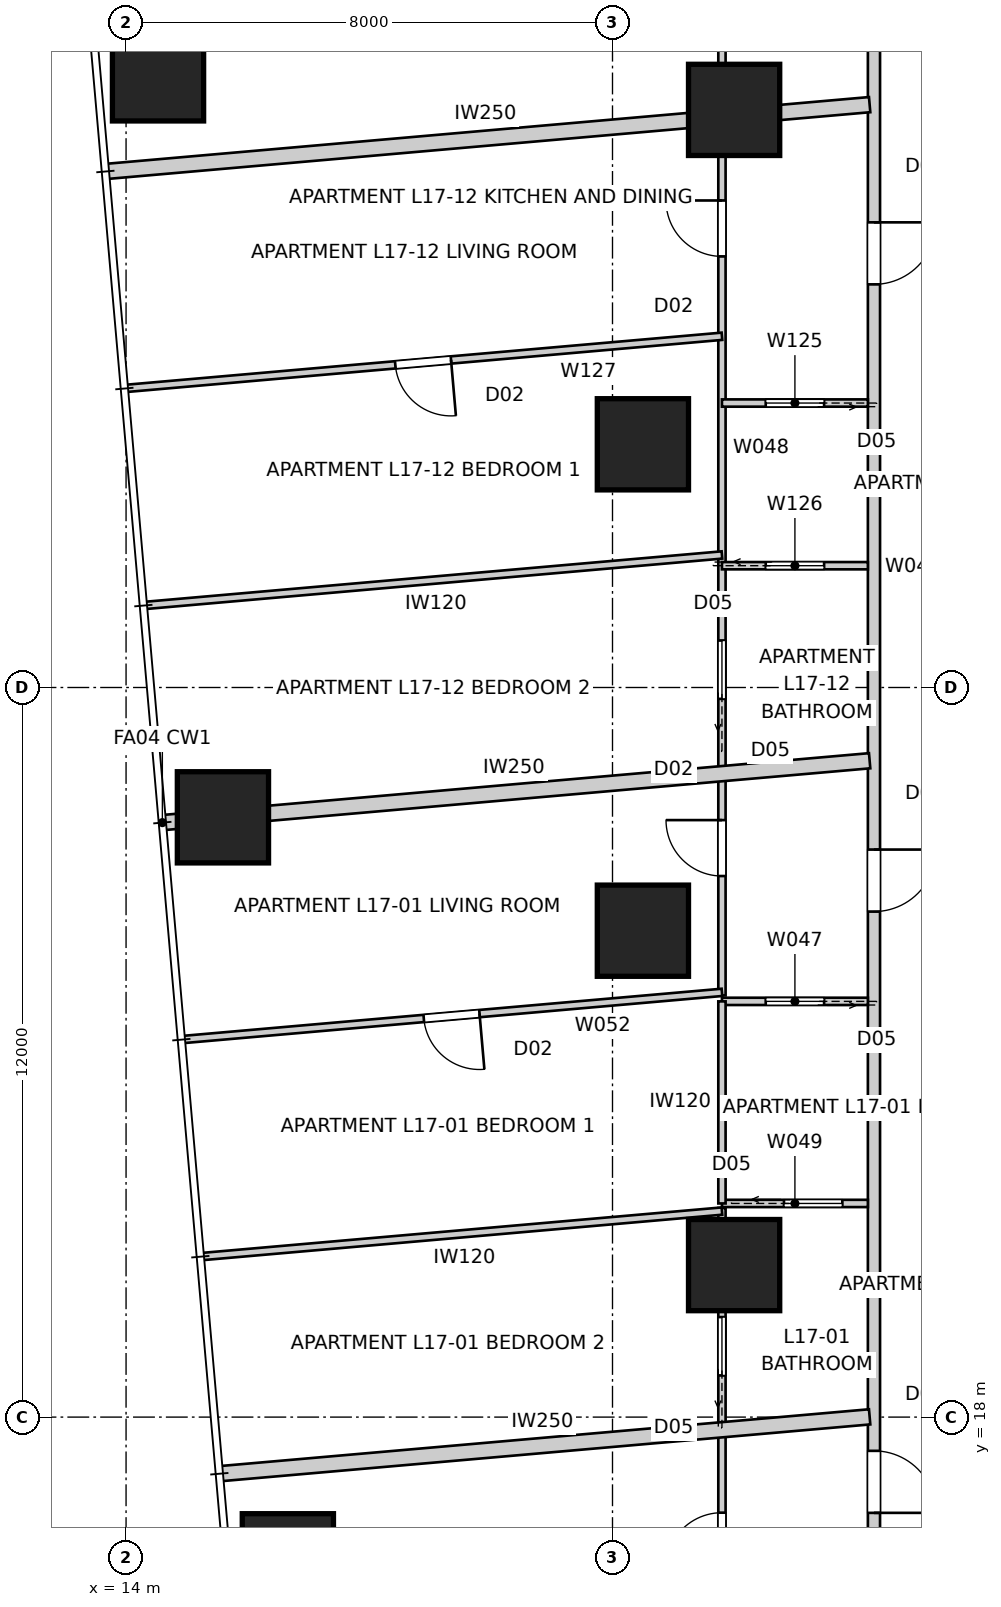
"""IFC4 building model, lengths in metres.
Left out: names, types, materials, properties, quantities, classifications, styles, units other than length and angle.
Written with IfcOpenShell. Run it as: python <this file> out.ifc"""

import sys

from ifc_helpers import new_model, si_unit, direction, frame, frame_2d, origin, origin_2d, place, context, subcontext, project, spatial, rectangle, extrude, element, fill, save


model = new_model("IFC4")
c1 = context("Model", 3, precision=1e-05, world=origin(), true_north=direction((0.0, 1.0)))
c2 = subcontext(c1, "Body", "Model", "MODEL_VIEW")
j1 = project(units=[si_unit("LENGTHUNIT", "METRE"), si_unit("PLANEANGLEUNIT", "RADIAN")], contexts=[c1])
p1 = place(None, origin())
s1 = spatial("IfcSite", under=j1, at=p1, CompositionType="ELEMENT")
p2 = place(p1, origin())
s2 = spatial("IfcBuilding", under=s1, at=p2, CompositionType="ELEMENT")
p3 = place(p2, frame((0.0, 0.0, 64.2)))
s3 = spatial("IfcBuildingStorey", under=s2, at=p3, CompositionType="ELEMENT", Elevation=64.2)
for number, where, z_axis, x_axis in (
    (1, (14.526, 40.068, 0.0), (0.0, 0.0, 1.0), (1.0, 0.0, 0.0)),
    (2, (15.593, 27.865, 0.0), (0.0, 0.0, 1.0), (1.0, 0.0, 0.0)),
    (3, (16.661, 15.661, 0.0), (0.0, 0.0, 1.0), (1.0, 0.0, 0.0)),
    (4, (24.0, 39.5, 0.0), (0.0, 0.0, 1.0), (1.0, 0.0, 0.0)),
    (5, (22.5, 34.0, 0.0), (0.0, 0.0, 1.0), (1.0, 0.0, 0.0)),
    (6, (22.5, 26.0, 0.0), (0.0, 0.0, 1.0), (1.0, 0.0, 0.0)),
    (7, (24.0, 20.5, 0.0), (0.0, 0.0, 1.0), (1.0, 0.0, 0.0)),
):
    element("IfcColumn", number, at=place(p3, frame(where, z_axis=z_axis, x_axis=x_axis)), inside=s3, PredefinedType="COLUMN", context=c2, shape_type="SweptSolid", body=[
        extrude(rectangle(XDim=1.5, YDim=1.5, at=origin_2d()), origin(), (0.0, 0.0, 1.0), 3.4),
    ])
p4 = place(p3, frame((26.3, 44.5, 0.0), z_axis=(0.0, 0.0, 1.0), x_axis=(0.0, -1.0, 0.0)))
e8 = element("IfcWall", 8, at=p4, inside=s3, PredefinedType="PARTITIONING", context=c2, shape_type="SweptSolid", body=[
    extrude(rectangle(XDim=29.0, YDim=0.2, at=frame_2d((14.5, 0.0))), origin(), (0.0, 0.0, 1.0), 3.25),
])
p5 = place(p4, frame((6.85, 0.0, 0.0)))
e9 = element("IfcOpeningElement", 9, at=p5, cuts=e8, PredefinedType="OPENING", context=c2, shape_type="SweptSolid", body=[
    extrude(rectangle(XDim=1.02, YDim=2.34, at=frame_2d((0.51, 1.17))), frame((0.0, 0.11, 0.0), z_axis=(0.0, -1.0, 0.0), x_axis=(1.0, 0.0, 0.0)), (0.0, 0.0, 1.0), 0.22),
])
p6 = place(p4, frame((2.345, 0.0, 0.0)))
e10 = element("IfcOpeningElement", 10, at=p6, cuts=e8, PredefinedType="OPENING", context=c2, shape_type="SweptSolid", body=[
    extrude(rectangle(XDim=1.02, YDim=2.1, at=frame_2d((0.51, 1.05))), frame((0.0, 0.11, 0.0), z_axis=(0.0, -1.0, 0.0), x_axis=(1.0, 0.0, 0.0)), (0.0, 0.0, 1.0), 0.22),
])
p7 = place(p4, frame((17.166, 0.0, 0.0)))
e11 = element("IfcOpeningElement", 11, at=p7, cuts=e8, PredefinedType="OPENING", context=c2, shape_type="SweptSolid", body=[
    extrude(rectangle(XDim=1.02, YDim=2.34, at=frame_2d((0.51, 1.17))), frame((0.0, 0.11, 0.0), z_axis=(0.0, -1.0, 0.0), x_axis=(1.0, 0.0, 0.0)), (0.0, 0.0, 1.0), 0.22),
])
p8 = place(p4, frame((27.055, 0.0, 0.0)))
e12 = element("IfcOpeningElement", 12, at=p8, cuts=e8, PredefinedType="OPENING", context=c2, shape_type="SweptSolid", body=[
    extrude(rectangle(XDim=1.02, YDim=2.34, at=frame_2d((0.51, 1.17))), frame((0.0, 0.11, 0.0), z_axis=(0.0, -1.0, 0.0), x_axis=(1.0, 0.0, 0.0)), (0.0, 0.0, 1.0), 0.22),
])
p9 = place(p3, frame((13.66, 38.487, 0.0), z_axis=(0.0, 0.0, 1.0), x_axis=(0.996194851608, 0.087153988028, 0.0)))
e13 = element("IfcWall", 13, at=p9, inside=s3, PredefinedType="PARTITIONING", context=c2, shape_type="SweptSolid", body=[
    extrude(rectangle(XDim=12.617, YDim=0.25, at=frame_2d((6.309, 0.0))), origin(), (0.0, 0.0, 1.0), 3.25),
])
p10 = place(p3, frame((15.534, 17.068, 0.0), z_axis=(0.0, 0.0, 1.0), x_axis=(0.996193939644, 0.08716441141, 0.0)))
e14 = element("IfcWall", 14, at=p10, inside=s3, PredefinedType="PARTITIONING", context=c2, shape_type="SweptSolid", body=[
    extrude(rectangle(XDim=10.736, YDim=0.25, at=frame_2d((5.368, 0.0))), origin(), (0.0, 0.0, 1.0), 3.25),
])
p11 = place(p3, frame((14.597, 27.778, 0.0), z_axis=(0.0, 0.0, 1.0), x_axis=(0.996195419442, 0.087147497287, 0.0)))
e15 = element("IfcWall", 15, at=p11, inside=s3, PredefinedType="PARTITIONING", context=c2, shape_type="SweptSolid", body=[
    extrude(rectangle(XDim=11.677, YDim=0.25, at=frame_2d((5.838, 0.0))), origin(), (0.0, 0.0, 1.0), 3.25),
])
p12 = place(p3, frame((26.2, 24.838, 0.0), z_axis=(0.0, 0.0, 1.0), x_axis=(-1.0, 0.0, 0.0)))
e16 = element("IfcWall", 16, at=p12, inside=s3, PredefinedType="PARTITIONING", context=c2, shape_type="SweptSolid", body=[
    extrude(rectangle(XDim=2.4, YDim=0.12, at=frame_2d((1.2, 0.0))), origin(), (0.0, 0.0, 1.0), 3.25),
])
p13 = place(p12, frame((0.72, 0.0, 0.0)))
e17 = element("IfcOpeningElement", 17, at=p13, cuts=e16, PredefinedType="OPENING", context=c2, shape_type="SweptSolid", body=[
    extrude(rectangle(XDim=0.96, YDim=2.1, at=frame_2d((0.48, 1.05))), frame((0.0, 0.07, 0.0), z_axis=(0.0, -1.0, 0.0), x_axis=(1.0, 0.0, 0.0)), (0.0, 0.0, 1.0), 0.14),
])
p14 = place(p3, frame((23.8, 24.936, 0.0), z_axis=(0.0, 0.0, 1.0), x_axis=(0.0, 1.0, 0.0)))
e18 = element("IfcWall", 18, at=p14, inside=s3, PredefinedType="PARTITIONING", context=c2, shape_type="SweptSolid", body=[
    extrude(rectangle(XDim=22.064, YDim=0.12, at=frame_2d((11.032, 0.0))), origin(), (0.0, 0.0, 1.0), 2.55),
])
p15 = place(p14, frame((12.155, 0.0, 0.0)))
e19 = element("IfcOpeningElement", 19, at=p15, cuts=e18, PredefinedType="OPENING", context=c2, shape_type="SweptSolid", body=[
    extrude(rectangle(XDim=0.92, YDim=2.34, at=frame_2d((0.46, 1.17))), frame((0.0, 0.07, 0.0), z_axis=(0.0, -1.0, 0.0), x_axis=(1.0, 0.0, 0.0)), (0.0, 0.0, 1.0), 0.14),
])
p16 = place(p14, frame((16.136, 0.0, 0.0)))
e20 = element("IfcOpeningElement", 20, at=p16, cuts=e18, PredefinedType="OPENING", context=c2, shape_type="SweptSolid", body=[
    extrude(rectangle(XDim=0.92, YDim=2.34, at=frame_2d((0.46, 1.17))), frame((0.0, 0.07, 0.0), z_axis=(0.0, -1.0, 0.0), x_axis=(1.0, 0.0, 0.0)), (0.0, 0.0, 1.0), 0.14),
])
p17 = place(p14, frame((1.964, 0.0, 0.0)))
e21 = element("IfcOpeningElement", 21, at=p17, cuts=e18, PredefinedType="OPENING", context=c2, shape_type="SweptSolid", body=[
    extrude(rectangle(XDim=0.92, YDim=2.34, at=frame_2d((0.46, 1.17))), frame((0.0, 0.07, 0.0), z_axis=(0.0, -1.0, 0.0), x_axis=(1.0, 0.0, 0.0)), (0.0, 0.0, 1.0), 0.14),
])
p18 = place(p14, frame((4.877, 0.0, 0.0)))
e22 = element("IfcOpeningElement", 22, at=p18, cuts=e18, PredefinedType="OPENING", context=c2, shape_type="SweptSolid", body=[
    extrude(rectangle(XDim=0.96, YDim=2.1, at=frame_2d((0.48, 1.05))), frame((0.0, 0.07, 0.0), z_axis=(0.0, -1.0, 0.0), x_axis=(1.0, 0.0, 0.0)), (0.0, 0.0, 1.0), 0.14),
])
p19 = place(p3, frame((23.8, 21.514, 0.0), z_axis=(0.0, 0.0, 1.0), x_axis=(1.0, 0.0, 0.0)))
e23 = element("IfcWall", 23, at=p19, inside=s3, PredefinedType="PARTITIONING", context=c2, shape_type="SweptSolid", body=[
    extrude(rectangle(XDim=2.4, YDim=0.12, at=frame_2d((1.2, 0.0))), origin(), (0.0, 0.0, 1.0), 3.25),
])
p20 = place(p19, frame((1.02, 0.0, 0.0)))
e24 = element("IfcOpeningElement", 24, at=p20, cuts=e23, PredefinedType="OPENING", context=c2, shape_type="SweptSolid", body=[
    extrude(rectangle(XDim=0.96, YDim=2.1, at=frame_2d((0.48, 1.05))), frame((0.0, 0.07, 0.0), z_axis=(0.0, -1.0, 0.0), x_axis=(1.0, 0.0, 0.0)), (0.0, 0.0, 1.0), 0.14),
])
p21 = place(p3, frame((23.8, 13.0, 0.0), z_axis=(0.0, 0.0, 1.0), x_axis=(0.0, 1.0, 0.0)))
e25 = element("IfcWall", 25, at=p21, inside=s3, PredefinedType="PARTITIONING", context=c2, shape_type="SweptSolid", body=[
    extrude(rectangle(XDim=8.439, YDim=0.12, at=frame_2d((4.219, 0.0))), origin(), (0.0, 0.0, 1.0), 2.55),
])
p22 = place(p21, frame((2.508, 0.0, 0.0)))
e26 = element("IfcOpeningElement", 26, at=p22, cuts=e25, PredefinedType="OPENING", context=c2, shape_type="SweptSolid", body=[
    extrude(rectangle(XDim=0.92, YDim=2.34, at=frame_2d((0.46, 1.17))), frame((0.0, 0.07, 0.0), z_axis=(0.0, -1.0, 0.0), x_axis=(1.0, 0.0, 0.0)), (0.0, 0.0, 1.0), 0.14),
])
p23 = place(p21, frame((5.685, 0.0, 0.0)))
e27 = element("IfcOpeningElement", 27, at=p23, cuts=e25, PredefinedType="OPENING", context=c2, shape_type="SweptSolid", body=[
    extrude(rectangle(XDim=0.96, YDim=2.1, at=frame_2d((0.48, 1.05))), frame((0.0, 0.07, 0.0), z_axis=(0.0, -1.0, 0.0), x_axis=(1.0, 0.0, 0.0)), (0.0, 0.0, 1.0), 0.14),
])
p24 = place(p3, frame((23.8, 21.514, 0.0), z_axis=(0.0, 0.0, 1.0), x_axis=(0.0, 1.0, 0.0)))
e28 = element("IfcWall", 28, at=p24, inside=s3, PredefinedType="PARTITIONING", context=c2, shape_type="SweptSolid", body=[
    extrude(rectangle(XDim=3.324, YDim=0.12, at=frame_2d((1.662, 0.0))), origin(), (0.0, 0.0, 1.0), 3.25),
])
p25 = place(p3, frame((23.8, 24.986, 0.0), z_axis=(0.0, 0.0, 1.0), x_axis=(-0.996194045583, -0.087163200634, 0.0)))
e29 = element("IfcWall", 29, at=p25, inside=s3, PredefinedType="PARTITIONING", context=c2, shape_type="SweptSolid", body=[
    extrude(rectangle(XDim=8.885, YDim=0.12, at=frame_2d((4.442, 0.0))), origin(), (0.0, 0.0, 1.0), 3.25),
])
p26 = place(p25, frame((4.002, 0.0, 0.0)))
e30 = element("IfcOpeningElement", 30, at=p26, cuts=e29, PredefinedType="OPENING", context=c2, shape_type="SweptSolid", body=[
    extrude(rectangle(XDim=0.92, YDim=2.34, at=frame_2d((0.46, 1.17))), frame((0.0, 0.07, 0.0), z_axis=(0.0, -1.0, 0.0), x_axis=(1.0, 0.0, 0.0)), (0.0, 0.0, 1.0), 0.14),
])
p27 = place(p3, frame((23.8, 21.389, 0.0), z_axis=(0.0, 0.0, 1.0), x_axis=(-0.996194273991, -0.087160590107, 0.0)))
e31 = element("IfcWall", 31, at=p27, inside=s3, PredefinedType="PARTITIONING", context=c2, shape_type="SweptSolid", body=[
    extrude(rectangle(XDim=8.571, YDim=0.12, at=frame_2d((4.286, 0.0))), origin(), (0.0, 0.0, 1.0), 3.25),
])
p28 = place(p3, frame((26.2, 34.678, 0.0), z_axis=(0.0, 0.0, 1.0), x_axis=(-1.0, 0.0, 0.0)))
e32 = element("IfcWall", 32, at=p28, inside=s3, PredefinedType="PARTITIONING", context=c2, shape_type="SweptSolid", body=[
    extrude(rectangle(XDim=2.4, YDim=0.12, at=frame_2d((1.2, 0.0))), origin(), (0.0, 0.0, 1.0), 3.25),
])
p29 = place(p28, frame((0.72, 0.0, 0.0)))
e33 = element("IfcOpeningElement", 33, at=p29, cuts=e32, PredefinedType="OPENING", context=c2, shape_type="SweptSolid", body=[
    extrude(rectangle(XDim=0.96, YDim=2.1, at=frame_2d((0.48, 1.05))), frame((0.0, 0.07, 0.0), z_axis=(0.0, -1.0, 0.0), x_axis=(1.0, 0.0, 0.0)), (0.0, 0.0, 1.0), 0.14),
])
p30 = place(p3, frame((23.8, 32.003, 0.0), z_axis=(0.0, 0.0, 1.0), x_axis=(1.0, 0.0, 0.0)))
e34 = element("IfcWall", 34, at=p30, inside=s3, PredefinedType="PARTITIONING", context=c2, shape_type="SweptSolid", body=[
    extrude(rectangle(XDim=2.4, YDim=0.12, at=frame_2d((1.2, 0.0))), origin(), (0.0, 0.0, 1.0), 3.25),
])
p31 = place(p30, frame((0.72, 0.0, 0.0)))
e35 = element("IfcOpeningElement", 35, at=p31, cuts=e34, PredefinedType="OPENING", context=c2, shape_type="SweptSolid", body=[
    extrude(rectangle(XDim=0.96, YDim=2.1, at=frame_2d((0.48, 1.05))), frame((0.0, 0.07, 0.0), z_axis=(0.0, -1.0, 0.0), x_axis=(1.0, 0.0, 0.0)), (0.0, 0.0, 1.0), 0.14),
])
p32 = place(p3, frame((23.8, 35.777, 0.0), z_axis=(0.0, 0.0, 1.0), x_axis=(-0.996195794011, -0.087143215425, 0.0)))
e36 = element("IfcWall", 36, at=p32, inside=s3, PredefinedType="PARTITIONING", context=c2, shape_type="SweptSolid", body=[
    extrude(rectangle(XDim=9.825, YDim=0.12, at=frame_2d((4.913, 0.0))), origin(), (0.0, 0.0, 1.0), 2.796),
])
p33 = place(p32, frame((4.473, 0.0, 0.0)))
e37 = element("IfcOpeningElement", 37, at=p33, cuts=e36, PredefinedType="OPENING", context=c2, shape_type="SweptSolid", body=[
    extrude(rectangle(XDim=0.92, YDim=2.34, at=frame_2d((0.46, 1.17))), frame((0.0, 0.07, 0.0), z_axis=(0.0, -1.0, 0.0), x_axis=(1.0, 0.0, 0.0)), (0.0, 0.0, 1.0), 0.14),
])
p34 = place(p3, frame((23.8, 32.18, 0.0), z_axis=(0.0, 0.0, 1.0), x_axis=(-0.996193828936, -0.087165676674, 0.0)))
e38 = element("IfcWall", 38, at=p34, inside=s3, PredefinedType="PARTITIONING", context=c2, shape_type="SweptSolid", body=[
    extrude(rectangle(XDim=9.512, YDim=0.12, at=frame_2d((4.756, 0.0))), origin(), (0.0, 0.0, 1.0), 3.25),
])
p35 = place(p5, origin())
e39 = element("IfcDoor", 39, at=p35, inside=s3, OperationType="SINGLE_SWING_LEFT", PredefinedType="DOOR", context=c2, shape_type="SweptSolid", body=[
    extrude(rectangle(XDim=1.02, YDim=2.34, at=frame_2d((0.51, 1.17))), frame((0.0, 0.025, 0.0), z_axis=(0.0, -1.0, 0.0), x_axis=(1.0, 0.0, 0.0)), (0.0, 0.0, 1.0), 0.05),
])
fill(e9, e39)
p36 = place(p7, origin())
e40 = element("IfcDoor", 40, at=p36, inside=s3, OperationType="SINGLE_SWING_LEFT", PredefinedType="DOOR", context=c2, shape_type="SweptSolid", body=[
    extrude(rectangle(XDim=1.02, YDim=2.34, at=frame_2d((0.51, 1.17))), frame((0.0, 0.025, 0.0), z_axis=(0.0, -1.0, 0.0), x_axis=(1.0, 0.0, 0.0)), (0.0, 0.0, 1.0), 0.05),
])
fill(e11, e40)
p37 = place(p8, origin())
e41 = element("IfcDoor", 41, at=p37, inside=s3, OperationType="SINGLE_SWING_RIGHT", PredefinedType="DOOR", context=c2, shape_type="SweptSolid", body=[
    extrude(rectangle(XDim=1.02, YDim=2.34, at=frame_2d((0.51, 1.17))), frame((0.0, 0.025, 0.0), z_axis=(0.0, -1.0, 0.0), x_axis=(1.0, 0.0, 0.0)), (0.0, 0.0, 1.0), 0.05),
])
fill(e12, e41)
p38 = place(p15, origin())
e42 = element("IfcDoor", 42, at=p38, inside=s3, OperationType="SINGLE_SWING_RIGHT", PredefinedType="DOOR", context=c2, shape_type="SweptSolid", body=[
    extrude(rectangle(XDim=0.92, YDim=2.34, at=frame_2d((0.46, 1.17))), frame((0.0, 0.025, 0.0), z_axis=(0.0, -1.0, 0.0), x_axis=(1.0, 0.0, 0.0)), (0.0, 0.0, 1.0), 0.05),
])
fill(e19, e42)
p39 = place(p29, origin())
e43 = element("IfcDoor", 43, at=p39, inside=s3, OperationType="SLIDING_TO_LEFT", PredefinedType="DOOR", context=c2, shape_type="SweptSolid", body=[
    extrude(rectangle(XDim=0.96, YDim=2.1, at=frame_2d((0.48, 1.05))), frame((0.0, 0.025, 0.0), z_axis=(0.0, -1.0, 0.0), x_axis=(1.0, 0.0, 0.0)), (0.0, 0.0, 1.0), 0.05),
])
fill(e33, e43)
p40 = place(p17, origin())
e44 = element("IfcDoor", 44, at=p40, inside=s3, OperationType="SINGLE_SWING_RIGHT", PredefinedType="DOOR", context=c2, shape_type="SweptSolid", body=[
    extrude(rectangle(XDim=0.92, YDim=2.34, at=frame_2d((0.46, 1.17))), frame((0.0, 0.025, 0.0), z_axis=(0.0, -1.0, 0.0), x_axis=(1.0, 0.0, 0.0)), (0.0, 0.0, 1.0), 0.05),
])
fill(e21, e44)
p41 = place(p13, origin())
e45 = element("IfcDoor", 45, at=p41, inside=s3, OperationType="SLIDING_TO_LEFT", PredefinedType="DOOR", context=c2, shape_type="SweptSolid", body=[
    extrude(rectangle(XDim=0.96, YDim=2.1, at=frame_2d((0.48, 1.05))), frame((0.0, 0.025, 0.0), z_axis=(0.0, -1.0, 0.0), x_axis=(1.0, 0.0, 0.0)), (0.0, 0.0, 1.0), 0.05),
])
fill(e17, e45)
p42 = place(p22, origin())
e46 = element("IfcDoor", 46, at=p42, inside=s3, OperationType="SINGLE_SWING_LEFT", PredefinedType="DOOR", context=c2, shape_type="SweptSolid", body=[
    extrude(rectangle(XDim=0.92, YDim=2.34, at=frame_2d((0.46, 1.17))), frame((0.0, 0.025, 0.0), z_axis=(0.0, -1.0, 0.0), x_axis=(1.0, 0.0, 0.0)), (0.0, 0.0, 1.0), 0.05),
])
fill(e26, e46)
p43 = place(p33, origin())
e47 = element("IfcDoor", 47, at=p43, inside=s3, OperationType="SINGLE_SWING_LEFT", PredefinedType="DOOR", context=c2, shape_type="SweptSolid", body=[
    extrude(rectangle(XDim=0.92, YDim=2.34, at=frame_2d((0.46, 1.17))), frame((0.0, 0.025, 0.0), z_axis=(0.0, -1.0, 0.0), x_axis=(1.0, 0.0, 0.0)), (0.0, 0.0, 1.0), 0.05),
])
fill(e37, e47)
p44 = place(p31, origin())
e48 = element("IfcDoor", 48, at=p44, inside=s3, OperationType="SLIDING_TO_LEFT", PredefinedType="DOOR", context=c2, shape_type="SweptSolid", body=[
    extrude(rectangle(XDim=0.96, YDim=2.1, at=frame_2d((0.48, 1.05))), frame((0.0, 0.025, 0.0), z_axis=(0.0, -1.0, 0.0), x_axis=(1.0, 0.0, 0.0)), (0.0, 0.0, 1.0), 0.05),
])
fill(e35, e48)
p45 = place(p26, origin())
e49 = element("IfcDoor", 49, at=p45, inside=s3, OperationType="SINGLE_SWING_LEFT", PredefinedType="DOOR", context=c2, shape_type="SweptSolid", body=[
    extrude(rectangle(XDim=0.92, YDim=2.34, at=frame_2d((0.46, 1.17))), frame((0.0, 0.025, 0.0), z_axis=(0.0, -1.0, 0.0), x_axis=(1.0, 0.0, 0.0)), (0.0, 0.0, 1.0), 0.05),
])
fill(e30, e49)
p46 = place(p20, origin())
e50 = element("IfcDoor", 50, at=p46, inside=s3, OperationType="SLIDING_TO_LEFT", PredefinedType="DOOR", context=c2, shape_type="SweptSolid", body=[
    extrude(rectangle(XDim=0.96, YDim=2.1, at=frame_2d((0.48, 1.05))), frame((0.0, 0.025, 0.0), z_axis=(0.0, -1.0, 0.0), x_axis=(1.0, 0.0, 0.0)), (0.0, 0.0, 1.0), 0.05),
])
fill(e24, e50)
p47 = place(p18, origin())
e51 = element("IfcDoor", 51, at=p47, inside=s3, OperationType="SLIDING_TO_LEFT", PredefinedType="DOOR", context=c2, shape_type="SweptSolid", body=[
    extrude(rectangle(XDim=0.96, YDim=2.1, at=frame_2d((0.48, 1.05))), frame((0.0, 0.025, 0.0), z_axis=(0.0, -1.0, 0.0), x_axis=(1.0, 0.0, 0.0)), (0.0, 0.0, 1.0), 0.05),
])
fill(e22, e51)
p48 = place(p23, origin())
e52 = element("IfcDoor", 52, at=p48, inside=s3, OperationType="SLIDING_TO_LEFT", PredefinedType="DOOR", context=c2, shape_type="SweptSolid", body=[
    extrude(rectangle(XDim=0.96, YDim=2.1, at=frame_2d((0.48, 1.05))), frame((0.0, 0.025, 0.0), z_axis=(0.0, -1.0, 0.0), x_axis=(1.0, 0.0, 0.0)), (0.0, 0.0, 1.0), 0.05),
])
fill(e27, e52)
save(model, sys.argv[1])
